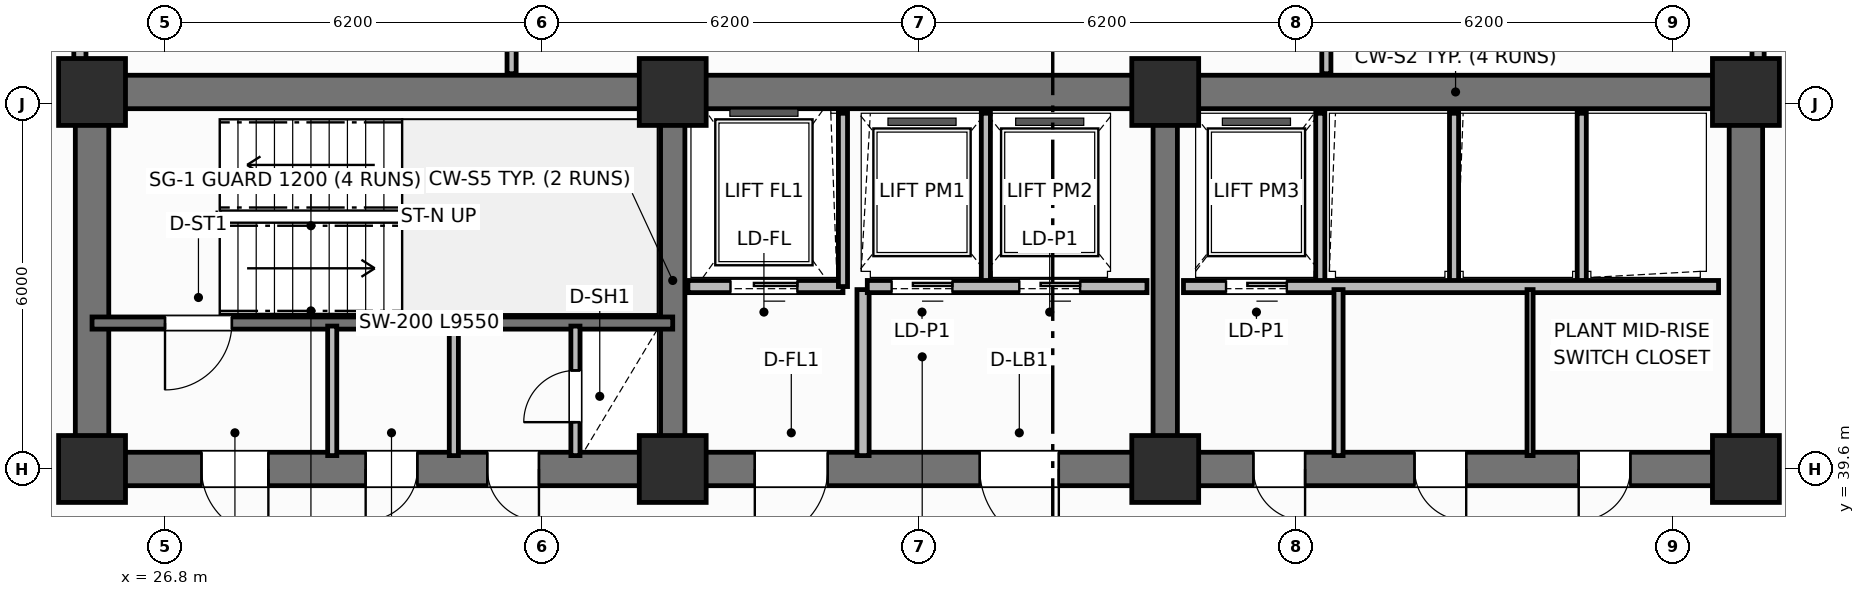
"""IFC4 building model, lengths in metres.
Left out: names, types, materials, properties, quantities, classifications, styles, units other than length and angle.
Written with IfcOpenShell. Run it as: python <this file> out.ifc"""

import sys

from ifc_helpers import new_model, si_unit, direction, frame, frame_2d, origin, origin_2d, place, context, subcontext, project, spatial, rectangle, extrude, element, fill, save


model = new_model("IFC4")
c1 = context("Model", 3, precision=1e-05, world=origin(), true_north=direction((0.0, 1.0)))
c2 = subcontext(c1, "Body", "Model", "MODEL_VIEW")
j1 = project(units=[si_unit("LENGTHUNIT", "METRE"), si_unit("PLANEANGLEUNIT", "RADIAN")], contexts=[c1])
p1 = place(None, origin())
s1 = spatial("IfcSite", under=j1, at=p1, CompositionType="ELEMENT")
p2 = place(p1, origin())
s2 = spatial("IfcBuilding", under=s1, at=p2, CompositionType="ELEMENT")
p3 = place(p2, frame((0.0, 0.0, 95.7)))
s3 = spatial("IfcBuildingStorey", under=s2, at=p3, CompositionType="ELEMENT", Elevation=95.7)
p4 = place(p3, frame((25.6, 45.8, 0.0), z_axis=(0.0, 0.0, 1.0), x_axis=(1.0, 0.0, 0.0)))
e1 = element("IfcWall", 1, at=p4, inside=s3, PredefinedType="SHEAR", context=c2, shape_type="SweptSolid", body=[
    extrude(rectangle(XDim=27.2, YDim=0.55, at=frame_2d((13.6, 0.0))), origin(), (0.0, 0.0, 1.0), 3.7),
])
for number, where, z_axis, x_axis in (
    (2, (25.6, 39.875, 0.0), (0.0, 0.0, 1.0), (0.0, 1.0, 0.0)),
    (3, (52.8, 39.875, 0.0), (0.0, 0.0, 1.0), (0.0, 1.0, 0.0)),
):
    element("IfcWall", number, at=place(p3, frame(where, z_axis=z_axis, x_axis=x_axis)), inside=s3, PredefinedType="SHEAR", context=c2, shape_type="SweptSolid", body=[
        extrude(rectangle(XDim=5.65, YDim=0.55, at=frame_2d((2.825, 0.0))), origin(), (0.0, 0.0, 1.0), 3.7),
    ])
p5 = place(p3, frame((52.8, 39.6, 0.0), z_axis=(0.0, 0.0, 1.0), x_axis=(-1.0, 0.0, 0.0)))
e4 = element("IfcWall", 4, at=p5, inside=s3, PredefinedType="SHEAR", context=c2, shape_type="SweptSolid", body=[
    extrude(rectangle(XDim=27.2, YDim=0.55, at=frame_2d((13.6, 0.0))), origin(), (0.0, 0.0, 1.0), 3.7),
])
p6 = place(p5, frame((24.3, 0.0, 0.0)))
e5 = element("IfcOpeningElement", 5, at=p6, cuts=e4, PredefinedType="OPENING", context=c2, shape_type="SweptSolid", body=[
    extrude(rectangle(XDim=1.1, YDim=2.15, at=frame_2d((0.55, 1.075))), frame((0.0, 0.285, 0.0), z_axis=(0.0, -1.0, 0.0), x_axis=(1.0, 0.0, 0.0)), (0.0, 0.0, 1.0), 0.57),
])
p7 = place(p5, frame((21.85, 0.0, 0.0)))
e6 = element("IfcOpeningElement", 6, at=p7, cuts=e4, PredefinedType="OPENING", context=c2, shape_type="SweptSolid", body=[
    extrude(rectangle(XDim=0.85, YDim=2.1, at=frame_2d((0.425, 1.05))), frame((0.0, 0.285, 0.0), z_axis=(0.0, -1.0, 0.0), x_axis=(1.0, 0.0, 0.0)), (0.0, 0.0, 1.0), 0.57),
])
p8 = place(p5, frame((19.85, 0.0, 0.0)))
e7 = element("IfcOpeningElement", 7, at=p8, cuts=e4, PredefinedType="OPENING", context=c2, shape_type="SweptSolid", body=[
    extrude(rectangle(XDim=0.85, YDim=2.1, at=frame_2d((0.425, 1.05))), frame((0.0, 0.285, 0.0), z_axis=(0.0, -1.0, 0.0), x_axis=(1.0, 0.0, 0.0)), (0.0, 0.0, 1.0), 0.57),
])
p9 = place(p5, frame((15.1, 0.0, 0.0)))
e8 = element("IfcOpeningElement", 8, at=p9, cuts=e4, PredefinedType="OPENING", context=c2, shape_type="SweptSolid", body=[
    extrude(rectangle(XDim=1.2, YDim=2.15, at=frame_2d((0.6, 1.075))), frame((0.0, 0.285, 0.0), z_axis=(0.0, -1.0, 0.0), x_axis=(1.0, 0.0, 0.0)), (0.0, 0.0, 1.0), 0.57),
])
p10 = place(p5, frame((11.3, 0.0, 0.0)))
e9 = element("IfcOpeningElement", 9, at=p10, cuts=e4, PredefinedType="OPENING", context=c2, shape_type="SweptSolid", body=[
    extrude(rectangle(XDim=1.3, YDim=2.2, at=frame_2d((0.65, 1.1))), frame((0.0, 0.285, 0.0), z_axis=(0.0, -1.0, 0.0), x_axis=(1.0, 0.0, 0.0)), (0.0, 0.0, 1.0), 0.57),
])
p11 = place(p5, frame((7.25, 0.0, 0.0)))
e10 = element("IfcOpeningElement", 10, at=p11, cuts=e4, PredefinedType="OPENING", context=c2, shape_type="SweptSolid", body=[
    extrude(rectangle(XDim=0.85, YDim=2.1, at=frame_2d((0.425, 1.05))), frame((0.0, 0.285, 0.0), z_axis=(0.0, -1.0, 0.0), x_axis=(1.0, 0.0, 0.0)), (0.0, 0.0, 1.0), 0.57),
])
p12 = place(p5, frame((4.6, 0.0, 0.0)))
e11 = element("IfcOpeningElement", 11, at=p12, cuts=e4, PredefinedType="OPENING", context=c2, shape_type="SweptSolid", body=[
    extrude(rectangle(XDim=0.85, YDim=2.1, at=frame_2d((0.425, 1.05))), frame((0.0, 0.285, 0.0), z_axis=(0.0, -1.0, 0.0), x_axis=(1.0, 0.0, 0.0)), (0.0, 0.0, 1.0), 0.57),
])
p13 = place(p5, frame((1.9, 0.0, 0.0)))
e12 = element("IfcOpeningElement", 12, at=p13, cuts=e4, PredefinedType="OPENING", context=c2, shape_type="SweptSolid", body=[
    extrude(rectangle(XDim=0.85, YDim=2.1, at=frame_2d((0.425, 1.05))), frame((0.0, 0.285, 0.0), z_axis=(0.0, -1.0, 0.0), x_axis=(1.0, 0.0, 0.0)), (0.0, 0.0, 1.0), 0.57),
])
for number, where, z_axis, x_axis in (
    (13, (35.15, 39.875, 0.0), (0.0, 0.0, 1.0), (0.0, 1.0, 0.0)),
    (14, (43.25, 39.875, 0.0), (0.0, 0.0, 1.0), (0.0, 1.0, 0.0)),
):
    element("IfcWall", number, at=place(p3, frame(where, z_axis=z_axis, x_axis=x_axis)), inside=s3, PredefinedType="SHEAR", context=c2, shape_type="SweptSolid", body=[
        extrude(rectangle(XDim=5.65, YDim=0.4, at=frame_2d((2.825, 0.0))), origin(), (0.0, 0.0, 1.0), 3.7),
    ])
for number, where, z_axis, x_axis in (
    (15, (25.6, 39.6, 0.0), (0.0, 0.0, 1.0), (1.0, 0.0, 0.0)),
    (16, (25.6, 45.8, 0.0), (0.0, 0.0, 1.0), (1.0, 0.0, 0.0)),
    (17, (35.15, 39.6, 0.0), (0.0, 0.0, 1.0), (1.0, 0.0, 0.0)),
    (18, (35.15, 45.8, 0.0), (0.0, 0.0, 1.0), (1.0, 0.0, 0.0)),
    (19, (43.25, 39.6, 0.0), (0.0, 0.0, 1.0), (1.0, 0.0, 0.0)),
    (20, (43.25, 45.8, 0.0), (0.0, 0.0, 1.0), (1.0, 0.0, 0.0)),
    (21, (52.8, 39.6, 0.0), (0.0, 0.0, 1.0), (1.0, 0.0, 0.0)),
    (22, (52.8, 45.8, 0.0), (0.0, 0.0, 1.0), (1.0, 0.0, 0.0)),
):
    element("IfcColumn", number, at=place(p3, frame(where, z_axis=z_axis, x_axis=x_axis)), inside=s3, PredefinedType="COLUMN", context=c2, shape_type="SweptSolid", body=[
        extrude(rectangle(XDim=1.1, YDim=1.1, at=origin_2d()), origin(), (0.0, 0.0, 1.0), 3.7),
    ])
p14 = place(p3, frame((35.15, 42.0, 0.0), z_axis=(0.0, 0.0, 1.0), x_axis=(-1.0, 0.0, 0.0)))
e23 = element("IfcWall", 23, at=p14, inside=s3, PredefinedType="SHEAR", context=c2, shape_type="SweptSolid", body=[
    extrude(rectangle(XDim=9.55, YDim=0.2, at=frame_2d((4.775, 0.0))), origin(), (0.0, 0.0, 1.0), 3.7),
])
p15 = place(p14, frame((7.25, 0.0, 0.0)))
e24 = element("IfcOpeningElement", 24, at=p15, cuts=e23, PredefinedType="OPENING", context=c2, shape_type="SweptSolid", body=[
    extrude(rectangle(XDim=1.1, YDim=2.15, at=frame_2d((0.55, 1.075))), frame((0.0, 0.11, 0.0), z_axis=(0.0, -1.0, 0.0), x_axis=(1.0, 0.0, 0.0)), (0.0, 0.0, 1.0), 0.22),
])
p16 = place(p3, frame((33.55, 39.82, 0.0), z_axis=(0.0, 0.0, 1.0), x_axis=(0.0, 1.0, 0.0)))
e25 = element("IfcWall", 25, at=p16, inside=s3, PredefinedType="PARTITIONING", context=c2, shape_type="SweptSolid", body=[
    extrude(rectangle(XDim=2.13, YDim=0.15, at=frame_2d((1.065, 0.0))), origin(), (0.0, 0.0, 1.0), 2.53),
])
p17 = place(p16, frame((0.55, 0.0, 0.0)))
e26 = element("IfcOpeningElement", 26, at=p17, cuts=e25, PredefinedType="OPENING", context=c2, shape_type="SweptSolid", body=[
    extrude(rectangle(XDim=0.85, YDim=2.05, at=frame_2d((0.425, 1.025))), frame((0.0, 0.085, 0.0), z_axis=(0.0, -1.0, 0.0), x_axis=(1.0, 0.0, 0.0)), (0.0, 0.0, 1.0), 0.17),
])
for number, where, z_axis, x_axis in (
    (27, (29.55, 39.82, 0.0), (0.0, 0.0, 1.0), (0.0, 1.0, 0.0)),
    (28, (31.55, 39.82, 0.0), (0.0, 0.0, 1.0), (0.0, 1.0, 0.0)),
):
    element("IfcWall", number, at=place(p3, frame(where, z_axis=z_axis, x_axis=x_axis)), inside=s3, PredefinedType="PARTITIONING", context=c2, shape_type="SweptSolid", body=[
        extrude(rectangle(XDim=2.13, YDim=0.15, at=frame_2d((1.065, 0.0))), origin(), (0.0, 0.0, 1.0), 2.53),
    ])
p18 = place(p3, frame((37.95, 42.6, 0.0), z_axis=(0.0, 0.0, 1.0), x_axis=(-1.0, 0.0, 0.0)))
e29 = element("IfcWall", 29, at=p18, inside=s3, PredefinedType="PARTITIONING", context=c2, shape_type="SweptSolid", body=[
    extrude(rectangle(XDim=2.55, YDim=0.2, at=frame_2d((1.275, 0.0))), origin(), (0.0, 0.0, 1.0), 2.3),
])
p19 = place(p18, frame((0.75, 0.0, 0.0)))
e30 = element("IfcOpeningElement", 30, at=p19, cuts=e29, PredefinedType="OPENING", context=c2, shape_type="SweptSolid", body=[
    extrude(rectangle(XDim=1.1, YDim=2.15, at=frame_2d((0.55, 1.075))), frame((0.0, 0.11, 0.0), z_axis=(0.0, -1.0, 0.0), x_axis=(1.0, 0.0, 0.0)), (0.0, 0.0, 1.0), 0.22),
])
p20 = place(p3, frame((37.95, 42.6, 0.0), z_axis=(0.0, 0.0, 1.0), x_axis=(0.0, 1.0, 0.0)))
e31 = element("IfcWall", 31, at=p20, inside=s3, PredefinedType="PARTITIONING", context=c2, shape_type="SweptSolid", body=[
    extrude(rectangle(XDim=2.85, YDim=0.15, at=frame_2d((1.425, 0.0))), origin(), (0.0, 0.0, 1.0), 2.53),
])
p21 = place(p3, frame((38.28, 39.82, 0.0), z_axis=(0.0, 0.0, 1.0), x_axis=(0.0, 1.0, 0.0)))
e32 = element("IfcWall", 32, at=p21, inside=s3, PredefinedType="PARTITIONING", context=c2, shape_type="SweptSolid", body=[
    extrude(rectangle(XDim=2.73, YDim=0.2, at=frame_2d((1.365, 0.0))), origin(), (0.0, 0.0, 1.0), 2.53),
])
p22 = place(p3, frame((40.3, 42.65, 0.0), z_axis=(0.0, 0.0, 1.0), x_axis=(0.0, 1.0, 0.0)))
e33 = element("IfcWall", 33, at=p22, inside=s3, PredefinedType="PARTITIONING", context=c2, shape_type="SweptSolid", body=[
    extrude(rectangle(XDim=2.8, YDim=0.15, at=frame_2d((1.4, 0.0))), origin(), (0.0, 0.0, 1.0), 2.53),
])
p23 = place(p3, frame((42.95, 42.6, 0.0), z_axis=(0.0, 0.0, 1.0), x_axis=(-1.0, 0.0, 0.0)))
e34 = element("IfcWall", 34, at=p23, inside=s3, PredefinedType="PARTITIONING", context=c2, shape_type="SweptSolid", body=[
    extrude(rectangle(XDim=4.6, YDim=0.2, at=frame_2d((2.3, 0.0))), origin(), (0.0, 0.0, 1.0), 2.3),
])
p24 = place(p23, frame((3.2, 0.0, 0.0)))
e35 = element("IfcOpeningElement", 35, at=p24, cuts=e34, PredefinedType="OPENING", context=c2, shape_type="SweptSolid", body=[
    extrude(rectangle(XDim=1.0, YDim=2.15, at=frame_2d((0.5, 1.075))), frame((0.0, 0.11, 0.0), z_axis=(0.0, -1.0, 0.0), x_axis=(1.0, 0.0, 0.0)), (0.0, 0.0, 1.0), 0.22),
])
p25 = place(p23, frame((1.1, 0.0, 0.0)))
e36 = element("IfcOpeningElement", 36, at=p25, cuts=e34, PredefinedType="OPENING", context=c2, shape_type="SweptSolid", body=[
    extrude(rectangle(XDim=1.0, YDim=2.15, at=frame_2d((0.5, 1.075))), frame((0.0, 0.11, 0.0), z_axis=(0.0, -1.0, 0.0), x_axis=(1.0, 0.0, 0.0)), (0.0, 0.0, 1.0), 0.22),
])
for number, where, z_axis, x_axis in (
    (37, (45.8, 42.65, 0.0), (0.0, 0.0, 1.0), (0.0, 1.0, 0.0)),
    (38, (48.0, 42.65, 0.0), (0.0, 0.0, 1.0), (0.0, 1.0, 0.0)),
    (39, (50.1, 42.65, 0.0), (0.0, 0.0, 1.0), (0.0, 1.0, 0.0)),
):
    element("IfcWall", number, at=place(p3, frame(where, z_axis=z_axis, x_axis=x_axis)), inside=s3, PredefinedType="PARTITIONING", context=c2, shape_type="SweptSolid", body=[
        extrude(rectangle(XDim=2.8, YDim=0.15, at=frame_2d((1.4, 0.0))), origin(), (0.0, 0.0, 1.0), 2.53),
    ])
p26 = place(p3, frame((52.35, 42.6, 0.0), z_axis=(0.0, 0.0, 1.0), x_axis=(-1.0, 0.0, 0.0)))
e40 = element("IfcWall", 40, at=p26, inside=s3, PredefinedType="PARTITIONING", context=c2, shape_type="SweptSolid", body=[
    extrude(rectangle(XDim=8.8, YDim=0.2, at=frame_2d((4.4, 0.0))), origin(), (0.0, 0.0, 1.0), 2.53),
])
p27 = place(p26, frame((7.1, 0.0, 0.0)))
e41 = element("IfcOpeningElement", 41, at=p27, cuts=e40, PredefinedType="OPENING", context=c2, shape_type="SweptSolid", body=[
    extrude(rectangle(XDim=1.0, YDim=2.15, at=frame_2d((0.5, 1.075))), frame((0.0, 0.11, 0.0), z_axis=(0.0, -1.0, 0.0), x_axis=(1.0, 0.0, 0.0)), (0.0, 0.0, 1.0), 0.22),
])
p28 = place(p3, frame((46.1, 39.82, 0.0), z_axis=(0.0, 0.0, 1.0), x_axis=(0.0, 1.0, 0.0)))
e42 = element("IfcWall", 42, at=p28, inside=s3, PredefinedType="PARTITIONING", context=c2, shape_type="SweptSolid", body=[
    extrude(rectangle(XDim=2.73, YDim=0.15, at=frame_2d((1.365, 0.0))), origin(), (0.0, 0.0, 1.0), 2.53),
])
p29 = place(p3, frame((49.25, 39.82, 0.0), z_axis=(0.0, 0.0, 1.0), x_axis=(0.0, 1.0, 0.0)))
e43 = element("IfcWall", 43, at=p29, inside=s3, PredefinedType="PARTITIONING", context=c2, shape_type="SweptSolid", body=[
    extrude(rectangle(XDim=2.73, YDim=0.1, at=frame_2d((1.365, 0.0))), origin(), (0.0, 0.0, 1.0), 2.53),
])
p30 = place(p3, frame((32.5, 46.1, 0.0), z_axis=(0.0, 0.0, 1.0), x_axis=(0.0, 1.0, 0.0)))
e44 = element("IfcWall", 44, at=p30, inside=s3, PredefinedType="PARTITIONING", context=c2, shape_type="SweptSolid", body=[
    extrude(rectangle(XDim=5.33, YDim=0.15, at=frame_2d((2.665, 0.0))), origin(), (0.0, 0.0, 1.0), 2.53),
])
p31 = place(p30, frame((0.85, 0.0, 0.0)))
e45 = element("IfcOpeningElement", 45, at=p31, cuts=e44, PredefinedType="OPENING", context=c2, shape_type="SweptSolid", body=[
    extrude(rectangle(XDim=0.9, YDim=2.1, at=frame_2d((0.45, 1.05))), frame((0.0, 0.085, 0.0), z_axis=(0.0, -1.0, 0.0), x_axis=(1.0, 0.0, 0.0)), (0.0, 0.0, 1.0), 0.17),
])
p32 = place(p3, frame((45.9, 46.1, 0.0), z_axis=(0.0, 0.0, 1.0), x_axis=(0.0, 1.0, 0.0)))
e46 = element("IfcWall", 46, at=p32, inside=s3, PredefinedType="PARTITIONING", context=c2, shape_type="SweptSolid", body=[
    extrude(rectangle(XDim=5.33, YDim=0.15, at=frame_2d((2.665, 0.0))), origin(), (0.0, 0.0, 1.0), 2.53),
])
p33 = place(p3, frame((25.4, 46.1, 0.0), z_axis=(0.0, 0.0, 1.0), x_axis=(0.0, 1.0, 0.0)))
e47 = element("IfcWall", 47, at=p33, inside=s3, PredefinedType="PARTITIONING", context=c2, shape_type="SweptSolid", body=[
    extrude(rectangle(XDim=4.33, YDim=0.2, at=frame_2d((2.165, 0.0))), origin(), (0.0, 0.0, 1.0), 2.53),
])
p34 = place(p33, frame((1.05, 0.0, 0.0)))
e48 = element("IfcOpeningElement", 48, at=p34, cuts=e47, PredefinedType="OPENING", context=c2, shape_type="SweptSolid", body=[
    extrude(rectangle(XDim=0.9, YDim=2.1, at=frame_2d((0.45, 1.05))), frame((0.0, 0.11, 0.0), z_axis=(0.0, -1.0, 0.0), x_axis=(1.0, 0.0, 0.0)), (0.0, 0.0, 1.0), 0.22),
])
p35 = place(p3, frame((53.0, 46.1, 0.0), z_axis=(0.0, 0.0, 1.0), x_axis=(0.0, 1.0, 0.0)))
e49 = element("IfcWall", 49, at=p35, inside=s3, PredefinedType="PARTITIONING", context=c2, shape_type="SweptSolid", body=[
    extrude(rectangle(XDim=4.33, YDim=0.2, at=frame_2d((2.165, 0.0))), origin(), (0.0, 0.0, 1.0), 2.53),
])
p36 = place(p35, frame((1.05, 0.0, 0.0)))
e50 = element("IfcOpeningElement", 50, at=p36, cuts=e49, PredefinedType="OPENING", context=c2, shape_type="SweptSolid", body=[
    extrude(rectangle(XDim=0.9, YDim=2.1, at=frame_2d((0.45, 1.05))), frame((0.0, 0.11, 0.0), z_axis=(0.0, -1.0, 0.0), x_axis=(1.0, 0.0, 0.0)), (0.0, 0.0, 1.0), 0.22),
])
p37 = place(p15, origin())
e51 = element("IfcDoor", 51, at=p37, inside=s3, OperationType="SINGLE_SWING_RIGHT", PredefinedType="DOOR", context=c2, shape_type="SweptSolid", body=[
    extrude(rectangle(XDim=1.1, YDim=2.15, at=frame_2d((0.55, 1.075))), frame((0.0, 0.025, 0.0), z_axis=(0.0, -1.0, 0.0), x_axis=(1.0, 0.0, 0.0)), (0.0, 0.0, 1.0), 0.05),
])
fill(e24, e51)
p38 = place(p17, origin())
e52 = element("IfcDoor", 52, at=p38, inside=s3, OperationType="SINGLE_SWING_LEFT", PredefinedType="TRAPDOOR", context=c2, shape_type="SweptSolid", body=[
    extrude(rectangle(XDim=0.85, YDim=2.05, at=frame_2d((0.425, 1.025))), frame((0.0, 0.025, 0.0), z_axis=(0.0, -1.0, 0.0), x_axis=(1.0, 0.0, 0.0)), (0.0, 0.0, 1.0), 0.05),
])
fill(e26, e52)
p39 = place(p19, origin())
e53 = element("IfcDoor", 53, at=p39, inside=s3, OperationType="SLIDING_TO_LEFT", PredefinedType="DOOR", context=c2, shape_type="SweptSolid", body=[
    extrude(rectangle(XDim=1.1, YDim=2.15, at=frame_2d((0.55, 1.075))), frame((0.0, 0.025, 0.0), z_axis=(0.0, -1.0, 0.0), x_axis=(1.0, 0.0, 0.0)), (0.0, 0.0, 1.0), 0.05),
])
fill(e30, e53)
p40 = place(p24, origin())
e54 = element("IfcDoor", 54, at=p40, inside=s3, OperationType="SLIDING_TO_LEFT", PredefinedType="DOOR", context=c2, shape_type="SweptSolid", body=[
    extrude(rectangle(XDim=1.0, YDim=2.15, at=frame_2d((0.5, 1.075))), frame((0.0, 0.025, 0.0), z_axis=(0.0, -1.0, 0.0), x_axis=(1.0, 0.0, 0.0)), (0.0, 0.0, 1.0), 0.05),
])
fill(e35, e54)
p41 = place(p25, origin())
e55 = element("IfcDoor", 55, at=p41, inside=s3, OperationType="SLIDING_TO_LEFT", PredefinedType="DOOR", context=c2, shape_type="SweptSolid", body=[
    extrude(rectangle(XDim=1.0, YDim=2.15, at=frame_2d((0.5, 1.075))), frame((0.0, 0.025, 0.0), z_axis=(0.0, -1.0, 0.0), x_axis=(1.0, 0.0, 0.0)), (0.0, 0.0, 1.0), 0.05),
])
fill(e36, e55)
p42 = place(p27, origin())
e56 = element("IfcDoor", 56, at=p42, inside=s3, OperationType="SLIDING_TO_LEFT", PredefinedType="DOOR", context=c2, shape_type="SweptSolid", body=[
    extrude(rectangle(XDim=1.0, YDim=2.15, at=frame_2d((0.5, 1.075))), frame((0.0, 0.025, 0.0), z_axis=(0.0, -1.0, 0.0), x_axis=(1.0, 0.0, 0.0)), (0.0, 0.0, 1.0), 0.05),
])
fill(e41, e56)
p43 = place(p6, origin())
e57 = element("IfcDoor", 57, at=p43, inside=s3, OperationType="SINGLE_SWING_LEFT", PredefinedType="DOOR", context=c2, shape_type="SweptSolid", body=[
    extrude(rectangle(XDim=1.1, YDim=2.15, at=frame_2d((0.55, 1.075))), frame((0.0, 0.025, 0.0), z_axis=(0.0, -1.0, 0.0), x_axis=(1.0, 0.0, 0.0)), (0.0, 0.0, 1.0), 0.05),
])
fill(e5, e57)
p44 = place(p7, origin())
e58 = element("IfcDoor", 58, at=p44, inside=s3, OperationType="SINGLE_SWING_RIGHT", PredefinedType="DOOR", context=c2, shape_type="SweptSolid", body=[
    extrude(rectangle(XDim=0.85, YDim=2.1, at=frame_2d((0.425, 1.05))), frame((0.0, 0.025, 0.0), z_axis=(0.0, -1.0, 0.0), x_axis=(1.0, 0.0, 0.0)), (0.0, 0.0, 1.0), 0.05),
])
fill(e6, e58)
p45 = place(p8, origin())
e59 = element("IfcDoor", 59, at=p45, inside=s3, OperationType="SINGLE_SWING_LEFT", PredefinedType="DOOR", context=c2, shape_type="SweptSolid", body=[
    extrude(rectangle(XDim=0.85, YDim=2.1, at=frame_2d((0.425, 1.05))), frame((0.0, 0.025, 0.0), z_axis=(0.0, -1.0, 0.0), x_axis=(1.0, 0.0, 0.0)), (0.0, 0.0, 1.0), 0.05),
])
fill(e7, e59)
p46 = place(p9, origin())
e60 = element("IfcDoor", 60, at=p46, inside=s3, OperationType="SINGLE_SWING_RIGHT", PredefinedType="DOOR", context=c2, shape_type="SweptSolid", body=[
    extrude(rectangle(XDim=1.2, YDim=2.15, at=frame_2d((0.6, 1.075))), frame((0.0, 0.025, 0.0), z_axis=(0.0, -1.0, 0.0), x_axis=(1.0, 0.0, 0.0)), (0.0, 0.0, 1.0), 0.05),
])
fill(e8, e60)
p47 = place(p10, origin())
e61 = element("IfcDoor", 61, at=p47, inside=s3, OperationType="SINGLE_SWING_LEFT", PredefinedType="DOOR", context=c2, shape_type="SweptSolid", body=[
    extrude(rectangle(XDim=1.3, YDim=2.2, at=frame_2d((0.65, 1.1))), frame((0.0, 0.025, 0.0), z_axis=(0.0, -1.0, 0.0), x_axis=(1.0, 0.0, 0.0)), (0.0, 0.0, 1.0), 0.05),
])
fill(e9, e61)
p48 = place(p11, origin())
e62 = element("IfcDoor", 62, at=p48, inside=s3, OperationType="SINGLE_SWING_LEFT", PredefinedType="DOOR", context=c2, shape_type="SweptSolid", body=[
    extrude(rectangle(XDim=0.85, YDim=2.1, at=frame_2d((0.425, 1.05))), frame((0.0, 0.025, 0.0), z_axis=(0.0, -1.0, 0.0), x_axis=(1.0, 0.0, 0.0)), (0.0, 0.0, 1.0), 0.05),
])
fill(e10, e62)
p49 = place(p12, origin())
e63 = element("IfcDoor", 63, at=p49, inside=s3, OperationType="SINGLE_SWING_LEFT", PredefinedType="DOOR", context=c2, shape_type="SweptSolid", body=[
    extrude(rectangle(XDim=0.85, YDim=2.1, at=frame_2d((0.425, 1.05))), frame((0.0, 0.025, 0.0), z_axis=(0.0, -1.0, 0.0), x_axis=(1.0, 0.0, 0.0)), (0.0, 0.0, 1.0), 0.05),
])
fill(e11, e63)
p50 = place(p13, origin())
e64 = element("IfcDoor", 64, at=p50, inside=s3, OperationType="SINGLE_SWING_RIGHT", PredefinedType="DOOR", context=c2, shape_type="SweptSolid", body=[
    extrude(rectangle(XDim=0.85, YDim=2.1, at=frame_2d((0.425, 1.05))), frame((0.0, 0.025, 0.0), z_axis=(0.0, -1.0, 0.0), x_axis=(1.0, 0.0, 0.0)), (0.0, 0.0, 1.0), 0.05),
])
fill(e12, e64)
save(model, sys.argv[1])
